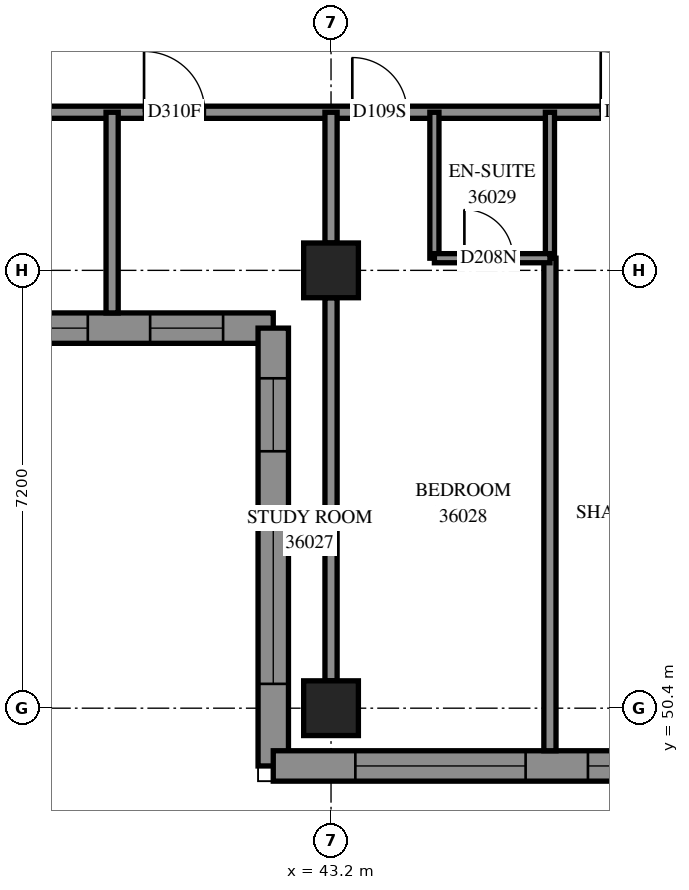
"""IFC4 building model, lengths in metres.
Left out: names, types, materials, properties, quantities, classifications, styles, units other than length and angle.
Written with IfcOpenShell. Run it as: python <this file> out.ifc"""

import sys

from ifc_helpers import new_model, si_unit, direction, frame, frame_2d, origin, origin_2d, place, context, subcontext, project, spatial, polyline, rectangle, outline, extrude, element, fill, save


model = new_model("IFC4")
c1 = context("Model", 3, precision=1e-05, world=origin(), true_north=direction((0.0, 1.0)))
c2 = subcontext(c1, "Body", "Model", "MODEL_VIEW")
j1 = project(units=[si_unit("LENGTHUNIT", "METRE"), si_unit("PLANEANGLEUNIT", "RADIAN")], contexts=[c1])
p1 = place(None, origin())
s1 = spatial("IfcSite", under=j1, at=p1, CompositionType="ELEMENT")
p2 = place(p1, origin())
s2 = spatial("IfcBuilding", under=s1, at=p2, CompositionType="ELEMENT")
p3 = place(p2, frame((0.0, 0.0, 135.4)))
s3 = spatial("IfcBuildingStorey", under=s2, at=p3, CompositionType="ELEMENT", Elevation=135.4)
for number, where, z_axis, x_axis in (
    (1, (43.2, 50.4, 0.0), (0.0, 0.0, 1.0), (1.0, 0.0, 0.0)),
    (2, (43.2, 57.6, 0.0), (0.0, 0.0, 1.0), (1.0, 0.0, 0.0)),
):
    element("IfcColumn", number, at=place(p3, frame(where, z_axis=z_axis, x_axis=x_axis)), inside=s3, PredefinedType="COLUMN", context=c2, shape_type="SweptSolid", body=[
        extrude(rectangle(XDim=0.9, YDim=0.9, at=origin_2d()), origin(), (0.0, 0.0, 1.0), 3.1),
    ])
p4 = place(p3, frame((35.05, 56.65, 0.0), z_axis=(0.0, 0.0, 1.0), x_axis=(1.0, 0.0, 0.0)))
e3 = element("IfcWall", 3, at=p4, inside=s3, PredefinedType="SOLIDWALL", context=c2, shape_type="SweptSolid", body=[
    extrude(outline(polyline([(-0.25, -0.25), (6.95, -0.25), (7.45, 0.25), (0.25, 0.25), (-0.25, -0.25)])), origin(), (0.0, 0.0, 1.0), 3.1),
])
p5 = place(p4, frame((1.35, 0.0, 0.45)))
e4 = element("IfcOpeningElement", 4, at=p5, cuts=e3, PredefinedType="OPENING", context=c2, shape_type="SweptSolid", body=[
    extrude(rectangle(XDim=2.8, YDim=2.5, at=frame_2d((1.4, 1.25))), frame((0.0, 0.26, 0.0), z_axis=(0.0, -1.0, 0.0), x_axis=(1.0, 0.0, 0.0)), (0.0, 0.0, 1.0), 0.52),
])
p6 = place(p4, frame((5.175, 0.0, 0.45)))
e5 = element("IfcOpeningElement", 5, at=p6, cuts=e3, PredefinedType="OPENING", context=c2, shape_type="SweptSolid", body=[
    extrude(rectangle(XDim=1.2, YDim=2.5, at=frame_2d((0.6, 1.25))), frame((0.0, 0.26, 0.0), z_axis=(0.0, -1.0, 0.0), x_axis=(1.0, 0.0, 0.0)), (0.0, 0.0, 1.0), 0.52),
])
p7 = place(p3, frame((42.25, 56.65, 0.0), z_axis=(0.0, 0.0, 1.0), x_axis=(0.0, -1.0, 0.0)))
e6 = element("IfcWall", 6, at=p7, inside=s3, PredefinedType="SOLIDWALL", context=c2, shape_type="SweptSolid", body=[
    extrude(outline(polyline([(0.25, -0.25), (7.45, -0.25), (6.95, 0.25), (-0.25, 0.25), (0.25, -0.25)])), origin(), (0.0, 0.0, 1.0), 3.1),
])
p8 = place(p7, frame((3.05, 0.0, 0.45)))
e7 = element("IfcOpeningElement", 7, at=p8, cuts=e6, PredefinedType="OPENING", context=c2, shape_type="SweptSolid", body=[
    extrude(rectangle(XDim=2.8, YDim=2.5, at=frame_2d((1.4, 1.25))), frame((0.0, 0.26, 0.0), z_axis=(0.0, -1.0, 0.0), x_axis=(1.0, 0.0, 0.0)), (0.0, 0.0, 1.0), 0.52),
])
p9 = place(p7, frame((0.825, 0.0, 0.45)))
e8 = element("IfcOpeningElement", 8, at=p9, cuts=e6, PredefinedType="OPENING", context=c2, shape_type="SweptSolid", body=[
    extrude(rectangle(XDim=1.2, YDim=2.5, at=frame_2d((0.6, 1.25))), frame((0.0, 0.26, 0.0), z_axis=(0.0, -1.0, 0.0), x_axis=(1.0, 0.0, 0.0)), (0.0, 0.0, 1.0), 0.52),
])
p10 = place(p3, frame((42.25, 49.45, 0.0), z_axis=(0.0, 0.0, 1.0), x_axis=(1.0, 0.0, 0.0)))
e9 = element("IfcWall", 9, at=p10, inside=s3, PredefinedType="SOLIDWALL", context=c2, shape_type="SweptSolid", body=[
    extrude(outline(polyline([(-0.25, -0.25), (6.95, -0.25), (7.45, 0.25), (0.25, 0.25), (-0.25, -0.25)])), origin(), (0.0, 0.0, 1.0), 3.1),
])
p11 = place(p10, frame((1.35, 0.0, 0.45)))
e10 = element("IfcOpeningElement", 10, at=p11, cuts=e9, PredefinedType="OPENING", context=c2, shape_type="SweptSolid", body=[
    extrude(rectangle(XDim=2.8, YDim=2.5, at=frame_2d((1.4, 1.25))), frame((0.0, 0.26, 0.0), z_axis=(0.0, -1.0, 0.0), x_axis=(1.0, 0.0, 0.0)), (0.0, 0.0, 1.0), 0.52),
])
p12 = place(p10, frame((5.175, 0.0, 0.45)))
e11 = element("IfcOpeningElement", 11, at=p12, cuts=e9, PredefinedType="OPENING", context=c2, shape_type="SweptSolid", body=[
    extrude(rectangle(XDim=1.2, YDim=2.5, at=frame_2d((0.6, 1.25))), frame((0.0, 0.26, 0.0), z_axis=(0.0, -1.0, 0.0), x_axis=(1.0, 0.0, 0.0)), (0.0, 0.0, 1.0), 0.52),
])
p13 = place(p3, frame((36.0, 60.2, 0.0), z_axis=(0.0, 0.0, 1.0), x_axis=(1.0, 0.0, 0.0)))
e12 = element("IfcWall", 12, at=p13, inside=s3, PredefinedType="PARTITIONING", context=c2, shape_type="SweptSolid", body=[
    extrude(rectangle(XDim=17.0, YDim=0.2, at=frame_2d((8.5, 0.0))), origin(), (0.0, 0.0, 1.0), 3.1),
])
p14 = place(p13, frame((15.805, 0.0, 0.0)))
e13 = element("IfcOpeningElement", 13, at=p14, cuts=e12, PredefinedType="OPENING", context=c2, shape_type="SweptSolid", body=[
    extrude(rectangle(XDim=1.0, YDim=2.1, at=frame_2d((0.5, 1.05))), frame((0.0, 0.11, 0.0), z_axis=(0.0, -1.0, 0.0), x_axis=(1.0, 0.0, 0.0)), (0.0, 0.0, 1.0), 0.22),
])
p15 = place(p13, frame((4.125, 0.0, 0.0)))
e14 = element("IfcOpeningElement", 14, at=p15, cuts=e12, PredefinedType="OPENING", context=c2, shape_type="SweptSolid", body=[
    extrude(rectangle(XDim=1.0, YDim=2.1, at=frame_2d((0.5, 1.05))), frame((0.0, 0.11, 0.0), z_axis=(0.0, -1.0, 0.0), x_axis=(1.0, 0.0, 0.0)), (0.0, 0.0, 1.0), 0.22),
])
p16 = place(p13, frame((7.55, 0.0, 0.0)))
e15 = element("IfcOpeningElement", 15, at=p16, cuts=e12, PredefinedType="OPENING", context=c2, shape_type="SweptSolid", body=[
    extrude(rectangle(XDim=0.9, YDim=2.1, at=frame_2d((0.45, 1.05))), frame((0.0, 0.11, 0.0), z_axis=(0.0, -1.0, 0.0), x_axis=(1.0, 0.0, 0.0)), (0.0, 0.0, 1.0), 0.22),
])
p17 = place(p13, frame((11.635, 0.0, 0.0)))
e16 = element("IfcOpeningElement", 16, at=p17, cuts=e12, PredefinedType="OPENING", context=c2, shape_type="SweptSolid", body=[
    extrude(rectangle(XDim=1.0, YDim=2.1, at=frame_2d((0.5, 1.05))), frame((0.0, 0.11, 0.0), z_axis=(0.0, -1.0, 0.0), x_axis=(1.0, 0.0, 0.0)), (0.0, 0.0, 1.0), 0.22),
])
p18 = place(p3, frame((46.8, 49.7, 0.0), z_axis=(0.0, 0.0, 1.0), x_axis=(0.0, 1.0, 0.0)))
e17 = element("IfcWall", 17, at=p18, inside=s3, PredefinedType="PARTITIONING", context=c2, shape_type="SweptSolid", body=[
    extrude(rectangle(XDim=8.1, YDim=0.2, at=frame_2d((4.05, 0.0))), origin(), (0.0, 0.0, 1.0), 3.1),
])
p19 = place(p3, frame((43.2, 50.85, 0.0), z_axis=(0.0, 0.0, 1.0), x_axis=(0.0, 1.0, 0.0)))
e18 = element("IfcWall", 18, at=p19, inside=s3, PredefinedType="PARTITIONING", context=c2, shape_type="SweptSolid", body=[
    extrude(rectangle(XDim=6.3, YDim=0.2, at=frame_2d((3.15, 0.0))), origin(), (0.0, 0.0, 1.0), 2.6),
])
p20 = place(p3, frame((39.6, 56.9, 0.0), z_axis=(0.0, 0.0, 1.0), x_axis=(0.0, 1.0, 0.0)))
e19 = element("IfcWall", 19, at=p20, inside=s3, PredefinedType="PARTITIONING", context=c2, shape_type="SweptSolid", body=[
    extrude(rectangle(XDim=3.3, YDim=0.2, at=frame_2d((1.65, 0.0))), origin(), (0.0, 0.0, 1.0), 3.1),
])
for number, where, z_axis, x_axis in (
    (20, (44.9, 57.8, 0.0), (0.0, 0.0, 1.0), (0.0, 1.0, 0.0)),
    (21, (46.8, 57.8, 0.0), (0.0, 0.0, 1.0), (0.0, 1.0, 0.0)),
):
    element("IfcWall", number, at=place(p3, frame(where, z_axis=z_axis, x_axis=x_axis)), inside=s3, PredefinedType="PARTITIONING", context=c2, shape_type="SweptSolid", body=[
        extrude(rectangle(XDim=2.4, YDim=0.15, at=frame_2d((1.2, 0.0))), origin(), (0.0, 0.0, 1.0), 3.1),
    ])
p21 = place(p3, frame((43.2, 58.05, 0.0), z_axis=(0.0, 0.0, 1.0), x_axis=(0.0, 1.0, 0.0)))
e22 = element("IfcWall", 22, at=p21, inside=s3, PredefinedType="PARTITIONING", context=c2, shape_type="SweptSolid", body=[
    extrude(rectangle(XDim=2.15, YDim=0.2, at=frame_2d((1.075, 0.0))), origin(), (0.0, 0.0, 1.0), 3.1),
])
p22 = place(p3, frame((44.9, 57.8, 0.0), z_axis=(0.0, 0.0, 1.0), x_axis=(1.0, 0.0, 0.0)))
e23 = element("IfcWall", 23, at=p22, inside=s3, PredefinedType="PARTITIONING", context=c2, shape_type="SweptSolid", body=[
    extrude(rectangle(XDim=1.9, YDim=0.15, at=frame_2d((0.95, 0.0))), origin(), (0.0, 0.0, 1.0), 3.1),
])
p23 = place(p22, frame((0.493, 0.0, 0.0)))
e24 = element("IfcOpeningElement", 24, at=p23, cuts=e23, PredefinedType="OPENING", context=c2, shape_type="SweptSolid", body=[
    extrude(rectangle(XDim=0.8, YDim=2.1, at=frame_2d((0.4, 1.05))), frame((0.0, 0.085, 0.0), z_axis=(0.0, -1.0, 0.0), x_axis=(1.0, 0.0, 0.0)), (0.0, 0.0, 1.0), 0.17),
])
p24 = place(p5, origin())
e25 = element("IfcWindow", 25, at=p24, inside=s3, PartitioningType="SINGLE_PANEL", PredefinedType="WINDOW", context=c2, shape_type="SweptSolid", body=[
    extrude(rectangle(XDim=2.8, YDim=2.5, at=frame_2d((1.4, 1.25))), frame((0.0, 0.18, 0.0), z_axis=(0.0, -1.0, 0.0), x_axis=(1.0, 0.0, 0.0)), (0.0, 0.0, 1.0), 0.06),
])
fill(e4, e25)
p25 = place(p6, origin())
e26 = element("IfcWindow", 26, at=p25, inside=s3, PartitioningType="SINGLE_PANEL", PredefinedType="WINDOW", context=c2, shape_type="SweptSolid", body=[
    extrude(rectangle(XDim=1.2, YDim=2.5, at=frame_2d((0.6, 1.25))), frame((0.0, 0.18, 0.0), z_axis=(0.0, -1.0, 0.0), x_axis=(1.0, 0.0, 0.0)), (0.0, 0.0, 1.0), 0.06),
])
fill(e5, e26)
p26 = place(p8, origin())
e27 = element("IfcWindow", 27, at=p26, inside=s3, PartitioningType="SINGLE_PANEL", PredefinedType="WINDOW", context=c2, shape_type="SweptSolid", body=[
    extrude(rectangle(XDim=2.8, YDim=2.5, at=frame_2d((1.4, 1.25))), frame((0.0, 0.18, 0.0), z_axis=(0.0, -1.0, 0.0), x_axis=(1.0, 0.0, 0.0)), (0.0, 0.0, 1.0), 0.06),
])
fill(e7, e27)
p27 = place(p9, origin())
e28 = element("IfcWindow", 28, at=p27, inside=s3, PartitioningType="SINGLE_PANEL", PredefinedType="WINDOW", context=c2, shape_type="SweptSolid", body=[
    extrude(rectangle(XDim=1.2, YDim=2.5, at=frame_2d((0.6, 1.25))), frame((0.0, 0.18, 0.0), z_axis=(0.0, -1.0, 0.0), x_axis=(1.0, 0.0, 0.0)), (0.0, 0.0, 1.0), 0.06),
])
fill(e8, e28)
p28 = place(p11, origin())
e29 = element("IfcWindow", 29, at=p28, inside=s3, PartitioningType="SINGLE_PANEL", PredefinedType="WINDOW", context=c2, shape_type="SweptSolid", body=[
    extrude(rectangle(XDim=2.8, YDim=2.5, at=frame_2d((1.4, 1.25))), frame((0.0, 0.18, 0.0), z_axis=(0.0, -1.0, 0.0), x_axis=(1.0, 0.0, 0.0)), (0.0, 0.0, 1.0), 0.06),
])
fill(e10, e29)
p29 = place(p12, origin())
e30 = element("IfcWindow", 30, at=p29, inside=s3, PartitioningType="SINGLE_PANEL", PredefinedType="WINDOW", context=c2, shape_type="SweptSolid", body=[
    extrude(rectangle(XDim=1.2, YDim=2.5, at=frame_2d((0.6, 1.25))), frame((0.0, 0.18, 0.0), z_axis=(0.0, -1.0, 0.0), x_axis=(1.0, 0.0, 0.0)), (0.0, 0.0, 1.0), 0.06),
])
fill(e11, e30)
p30 = place(p15, origin())
e31 = element("IfcDoor", 31, at=p30, inside=s3, OperationType="SINGLE_SWING_RIGHT", PredefinedType="DOOR", context=c2, shape_type="SweptSolid", body=[
    extrude(rectangle(XDim=1.0, YDim=2.1, at=frame_2d((0.5, 1.05))), frame((0.0, 0.025, 0.0), z_axis=(0.0, -1.0, 0.0), x_axis=(1.0, 0.0, 0.0)), (0.0, 0.0, 1.0), 0.05),
])
fill(e14, e31)
p31 = place(p16, origin())
e32 = element("IfcDoor", 32, at=p31, inside=s3, OperationType="SINGLE_SWING_LEFT", PredefinedType="DOOR", context=c2, shape_type="SweptSolid", body=[
    extrude(rectangle(XDim=0.9, YDim=2.1, at=frame_2d((0.45, 1.05))), frame((0.0, 0.025, 0.0), z_axis=(0.0, -1.0, 0.0), x_axis=(1.0, 0.0, 0.0)), (0.0, 0.0, 1.0), 0.05),
])
fill(e15, e32)
p32 = place(p23, origin())
e33 = element("IfcDoor", 33, at=p32, inside=s3, OperationType="SINGLE_SWING_RIGHT", PredefinedType="DOOR", context=c2, shape_type="SweptSolid", body=[
    extrude(rectangle(XDim=0.8, YDim=2.1, at=frame_2d((0.4, 1.05))), frame((0.0, 0.025, 0.0), z_axis=(0.0, -1.0, 0.0), x_axis=(1.0, 0.0, 0.0)), (0.0, 0.0, 1.0), 0.05),
])
fill(e24, e33)
p33 = place(p17, origin())
e34 = element("IfcDoor", 34, at=p33, inside=s3, OperationType="SINGLE_SWING_RIGHT", PredefinedType="DOOR", context=c2, shape_type="SweptSolid", body=[
    extrude(rectangle(XDim=1.0, YDim=2.1, at=frame_2d((0.5, 1.05))), frame((0.0, 0.025, 0.0), z_axis=(0.0, -1.0, 0.0), x_axis=(1.0, 0.0, 0.0)), (0.0, 0.0, 1.0), 0.05),
])
fill(e16, e34)
save(model, sys.argv[1])
